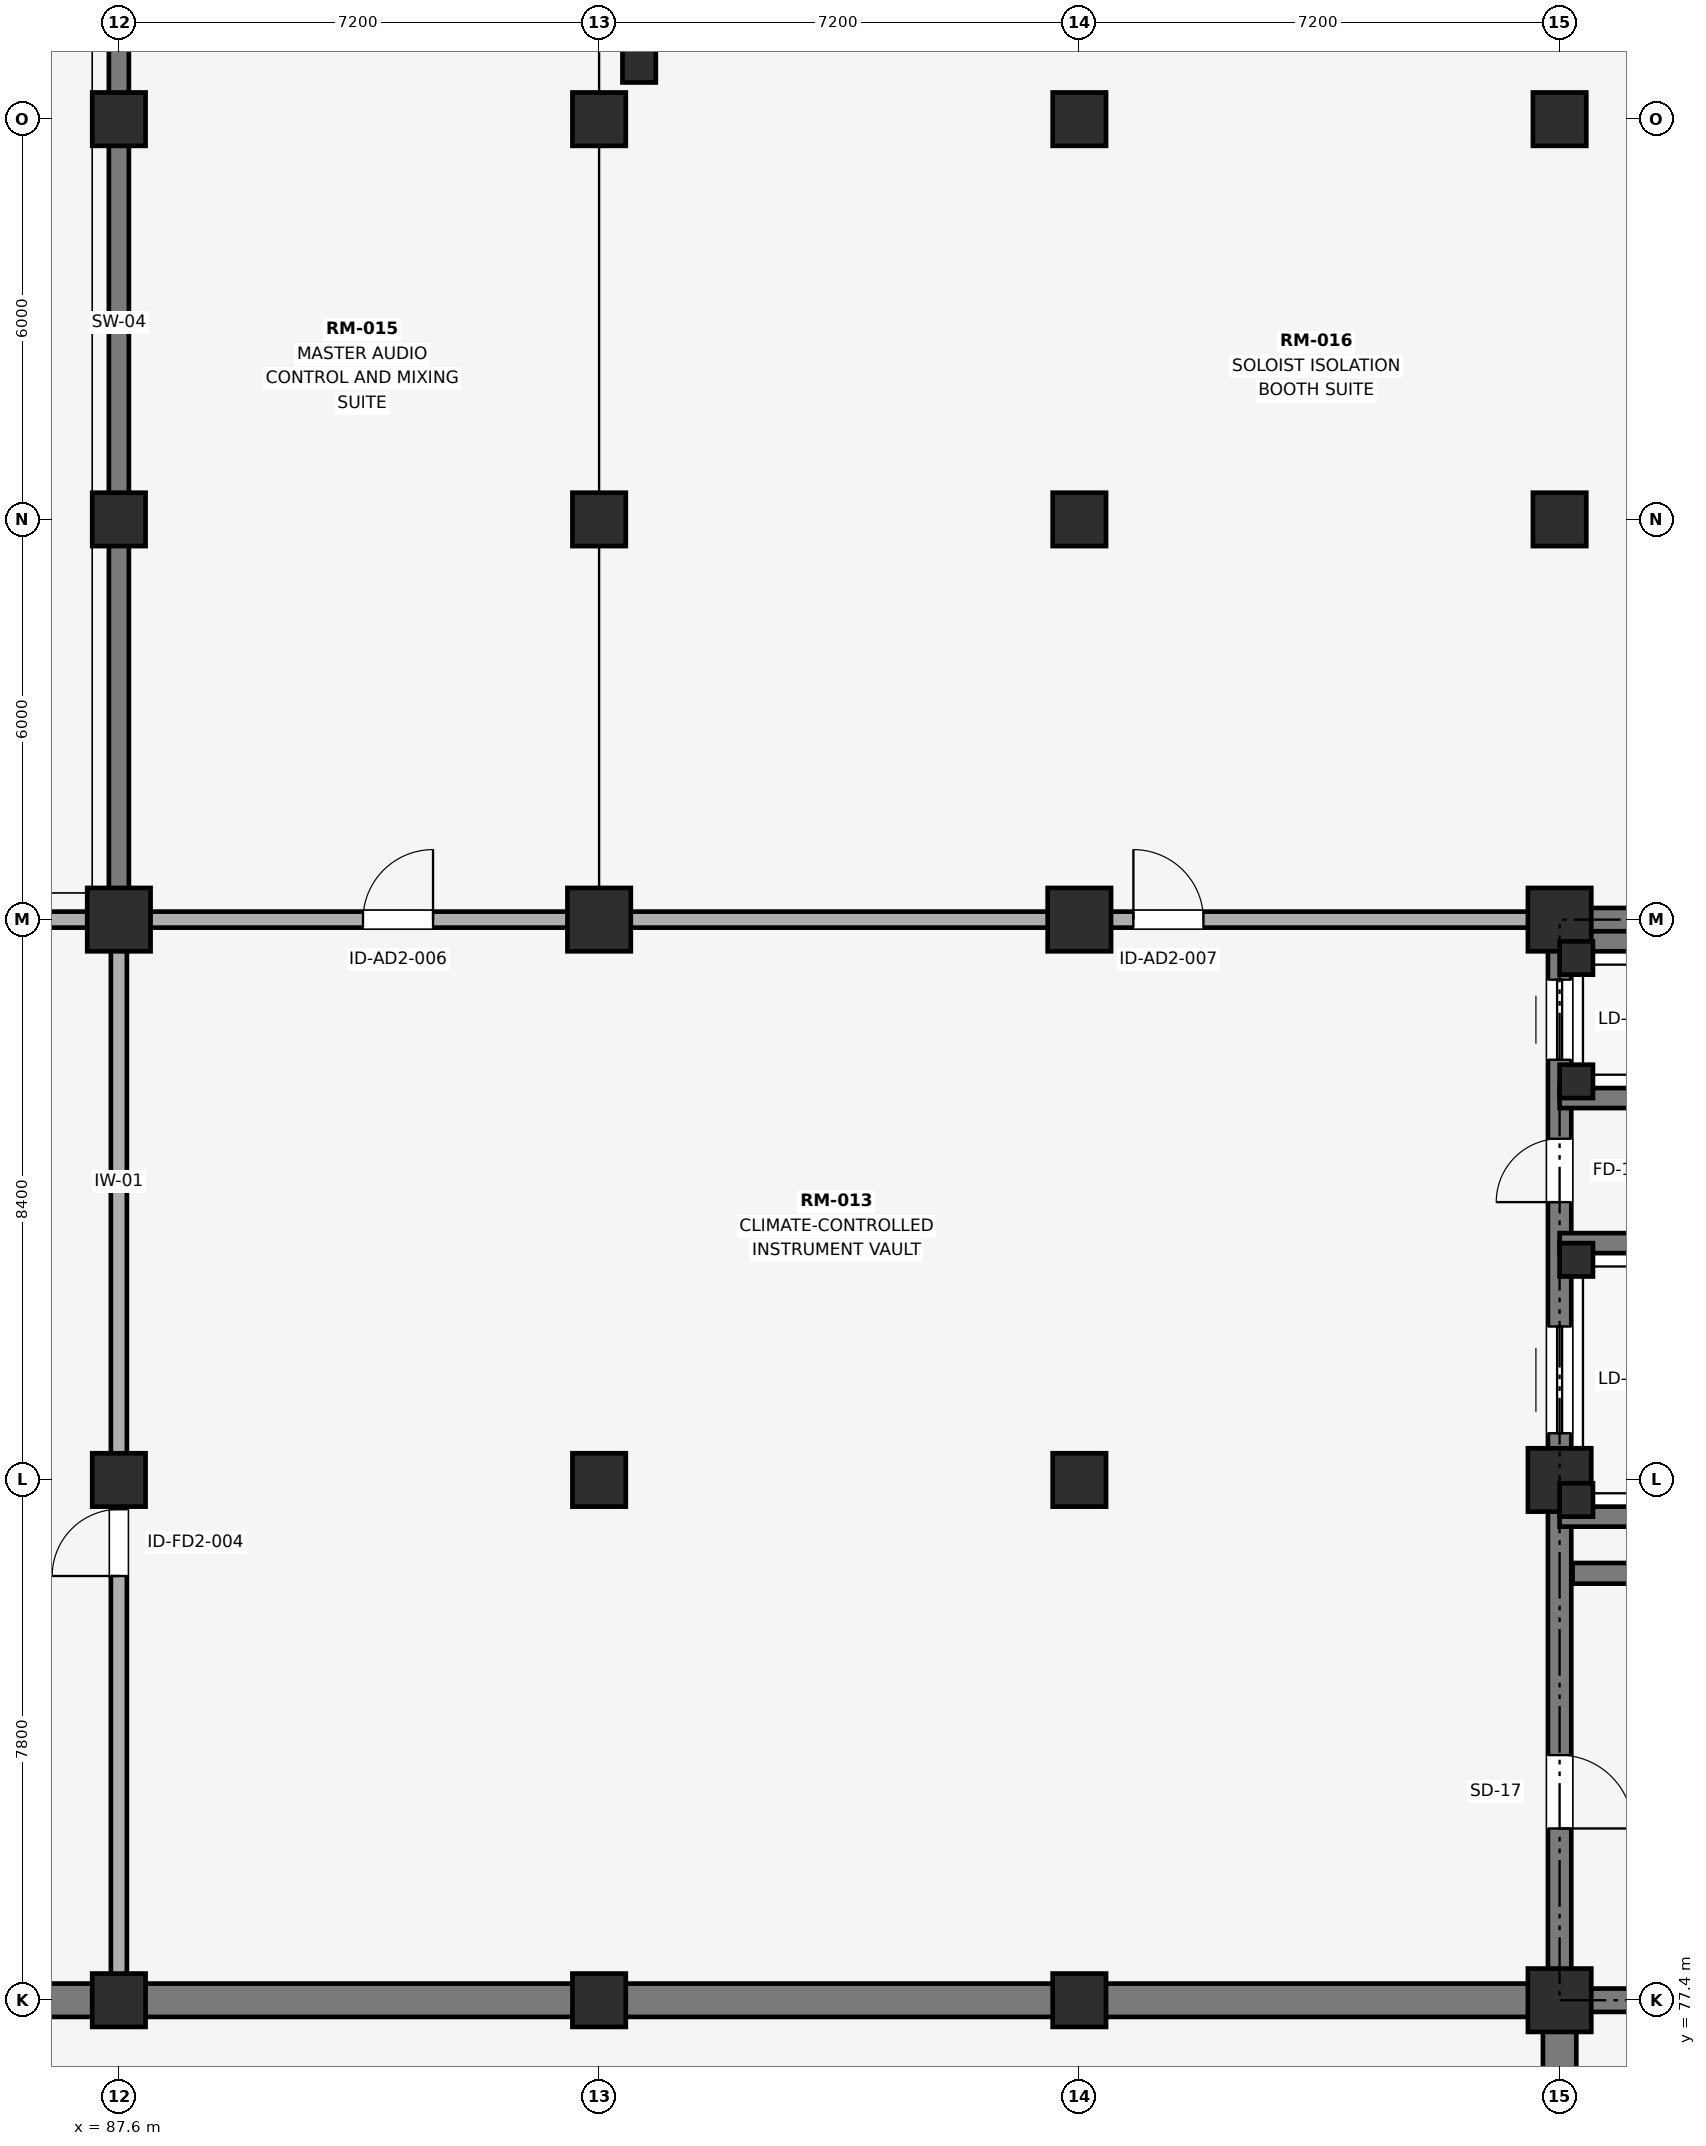
"""IFC4 building model, lengths in metres.
Left out: names, types, materials, properties, quantities, classifications, styles, units other than length and angle.
Written with IfcOpenShell. Run it as: python <this file> out.ifc"""

import sys

from ifc_helpers import new_model, si_unit, direction, frame, frame_2d, origin, origin_2d, place, context, subcontext, project, spatial, rectangle, extrude, element, fill, save


model = new_model("IFC4")
c1 = context("Model", 3, precision=1e-05, world=origin(), true_north=direction((0.0, 1.0)))
c2 = subcontext(c1, "Body", "Model", "MODEL_VIEW")
j1 = project(units=[si_unit("LENGTHUNIT", "METRE"), si_unit("PLANEANGLEUNIT", "RADIAN")], contexts=[c1])
p1 = place(None, origin())
s1 = spatial("IfcSite", under=j1, at=p1, CompositionType="ELEMENT")
p2 = place(p1, origin())
s2 = spatial("IfcBuilding", under=s1, at=p2, CompositionType="ELEMENT")
p3 = place(p2, frame((0.0, 0.0, -4.8)))
s3 = spatial("IfcBuildingStorey", under=s2, at=p3, CompositionType="ELEMENT", Elevation=-4.8)
for number, where, z_axis, x_axis in (
    (1, (87.6, 77.4, -0.45), (0.0, 0.0, 1.0), (1.0, 0.0, 0.0)),
    (2, (87.6, 85.2, -0.45), (0.0, 0.0, 1.0), (1.0, 0.0, 0.0)),
):
    element("IfcColumn", number, at=place(p3, frame(where, z_axis=z_axis, x_axis=x_axis)), inside=s3, PredefinedType="COLUMN", context=c2, shape_type="SweptSolid", body=[
        extrude(rectangle(XDim=0.8, YDim=0.8, at=origin_2d()), origin(), (0.0, 0.0, 1.0), 5.25),
    ])
p4 = place(p3, frame((87.6, 93.6, -0.45), z_axis=(0.0, 0.0, 1.0), x_axis=(1.0, 0.0, 0.0)))
e3 = element("IfcColumn", 3, at=p4, inside=s3, PredefinedType="COLUMN", context=c2, shape_type="SweptSolid", body=[
    extrude(rectangle(XDim=0.95, YDim=0.95, at=origin_2d()), origin(), (0.0, 0.0, 1.0), 5.25),
])
for number, where, z_axis, x_axis in (
    (4, (87.6, 99.6, -0.38), (0.0, 0.0, 1.0), (1.0, 0.0, 0.0)),
    (5, (87.6, 105.6, -0.38), (0.0, 0.0, 1.0), (1.0, 0.0, 0.0)),
):
    element("IfcColumn", number, at=place(p3, frame(where, z_axis=z_axis, x_axis=x_axis)), inside=s3, PredefinedType="COLUMN", context=c2, shape_type="SweptSolid", body=[
        extrude(rectangle(XDim=0.8, YDim=0.8, at=origin_2d()), origin(), (0.0, 0.0, 1.0), 5.18),
    ])
for number, where, z_axis, x_axis in (
    (6, (94.8, 77.4, -0.45), (0.0, 0.0, 1.0), (1.0, 0.0, 0.0)),
    (7, (94.8, 85.2, -0.45), (0.0, 0.0, 1.0), (1.0, 0.0, 0.0)),
):
    element("IfcColumn", number, at=place(p3, frame(where, z_axis=z_axis, x_axis=x_axis)), inside=s3, PredefinedType="COLUMN", context=c2, shape_type="SweptSolid", body=[
        extrude(rectangle(XDim=0.8, YDim=0.8, at=origin_2d()), origin(), (0.0, 0.0, 1.0), 5.25),
    ])
p5 = place(p3, frame((94.8, 93.6, -0.45), z_axis=(0.0, 0.0, 1.0), x_axis=(1.0, 0.0, 0.0)))
e8 = element("IfcColumn", 8, at=p5, inside=s3, PredefinedType="COLUMN", context=c2, shape_type="SweptSolid", body=[
    extrude(rectangle(XDim=0.95, YDim=0.95, at=origin_2d()), origin(), (0.0, 0.0, 1.0), 5.25),
])
for number, where, z_axis, x_axis in (
    (9, (94.8, 99.6, -0.45), (0.0, 0.0, 1.0), (1.0, 0.0, 0.0)),
    (10, (94.8, 105.6, -0.45), (0.0, 0.0, 1.0), (1.0, 0.0, 0.0)),
    (11, (102.0, 77.4, -0.45), (0.0, 0.0, 1.0), (1.0, 0.0, 0.0)),
    (12, (102.0, 85.2, -0.45), (0.0, 0.0, 1.0), (1.0, 0.0, 0.0)),
):
    element("IfcColumn", number, at=place(p3, frame(where, z_axis=z_axis, x_axis=x_axis)), inside=s3, PredefinedType="COLUMN", context=c2, shape_type="SweptSolid", body=[
        extrude(rectangle(XDim=0.8, YDim=0.8, at=origin_2d()), origin(), (0.0, 0.0, 1.0), 5.25),
    ])
p6 = place(p3, frame((102.0, 93.6, -0.45), z_axis=(0.0, 0.0, 1.0), x_axis=(1.0, 0.0, 0.0)))
e13 = element("IfcColumn", 13, at=p6, inside=s3, PredefinedType="COLUMN", context=c2, shape_type="SweptSolid", body=[
    extrude(rectangle(XDim=0.95, YDim=0.95, at=origin_2d()), origin(), (0.0, 0.0, 1.0), 5.25),
])
for number, where, z_axis, x_axis in (
    (14, (102.0, 99.6, -0.45), (0.0, 0.0, 1.0), (1.0, 0.0, 0.0)),
    (15, (102.0, 105.6, -0.45), (0.0, 0.0, 1.0), (1.0, 0.0, 0.0)),
):
    element("IfcColumn", number, at=place(p3, frame(where, z_axis=z_axis, x_axis=x_axis)), inside=s3, PredefinedType="COLUMN", context=c2, shape_type="SweptSolid", body=[
        extrude(rectangle(XDim=0.8, YDim=0.8, at=origin_2d()), origin(), (0.0, 0.0, 1.0), 5.25),
    ])
for number, where, z_axis, x_axis in (
    (16, (109.2, 77.4, -0.45), (0.0, 0.0, 1.0), (1.0, 0.0, 0.0)),
    (17, (109.2, 85.2, -0.45), (0.0, 0.0, 1.0), (1.0, 0.0, 0.0)),
    (18, (109.2, 93.6, -0.45), (0.0, 0.0, 1.0), (1.0, 0.0, 0.0)),
):
    element("IfcColumn", number, at=place(p3, frame(where, z_axis=z_axis, x_axis=x_axis)), inside=s3, PredefinedType="COLUMN", context=c2, shape_type="SweptSolid", body=[
        extrude(rectangle(XDim=0.95, YDim=0.95, at=origin_2d()), origin(), (0.0, 0.0, 1.0), 5.25),
    ])
for number, where, z_axis, x_axis in (
    (19, (109.2, 99.6, -0.45), (0.0, 0.0, 1.0), (1.0, 0.0, 0.0)),
    (20, (109.2, 105.6, -0.45), (0.0, 0.0, 1.0), (1.0, 0.0, 0.0)),
):
    element("IfcColumn", number, at=place(p3, frame(where, z_axis=z_axis, x_axis=x_axis)), inside=s3, PredefinedType="COLUMN", context=c2, shape_type="SweptSolid", body=[
        extrude(rectangle(XDim=0.8, YDim=0.8, at=origin_2d()), origin(), (0.0, 0.0, 1.0), 5.25),
    ])
p7 = place(p3, frame((58.59, 77.4, 0.0), z_axis=(0.0, 0.0, 1.0), x_axis=(1.0, 0.0, 0.0)))
e21 = element("IfcWall", 21, at=p7, inside=s3, PredefinedType="SOLIDWALL", context=c2, shape_type="SweptSolid", body=[
    extrude(rectangle(XDim=50.82, YDim=0.5, at=frame_2d((25.41, 0.0))), origin(), (0.0, 0.0, 1.0), 4.8),
])
p8 = place(p3, frame((109.2, 46.41, 0.0), z_axis=(0.0, 0.0, 1.0), x_axis=(0.0, 1.0, 0.0)))
e22 = element("IfcWall", 22, at=p8, inside=s3, PredefinedType="SOLIDWALL", context=c2, shape_type="SweptSolid", body=[
    extrude(rectangle(XDim=30.78, YDim=0.5, at=frame_2d((15.39, 0.0))), origin(), (0.0, 0.0, 1.0), 4.8),
])
p9 = place(p8, frame((4.19, 0.0, 0.0)))
e23 = element("IfcOpeningElement", 23, at=p9, cuts=e22, PredefinedType="OPENING", context=c2, shape_type="SweptSolid", body=[
    extrude(rectangle(XDim=0.95, YDim=2.1, at=frame_2d((0.475, 1.05))), frame((0.0, 0.26, 0.0), z_axis=(0.0, -1.0, 0.0), x_axis=(1.0, 0.0, 0.0)), (0.0, 0.0, 1.0), 0.52),
])
p10 = place(p3, frame((87.6, 93.75, 0.0), z_axis=(0.0, 0.0, 1.0), x_axis=(0.0, 1.0, 0.0)))
e24 = element("IfcWall", 24, at=p10, inside=s3, PredefinedType="SHEAR", context=c2, shape_type="SweptSolid", body=[
    extrude(rectangle(XDim=17.6, YDim=0.3, at=frame_2d((8.8, 0.0))), origin(), (0.0, 0.0, 1.0), 4.8),
])
p11 = place(p3, frame((109.52, 77.4, 0.0), z_axis=(0.0, 0.0, 1.0), x_axis=(1.0, 0.0, 0.0)))
e25 = element("IfcWall", 25, at=p11, inside=s3, PredefinedType="SHEAR", context=c2, shape_type="SweptSolid", body=[
    extrude(rectangle(XDim=9.455, YDim=0.35, at=frame_2d((4.728, 0.0))), origin(), (0.0, 0.0, 1.0), 4.8),
])
p12 = place(p3, frame((109.025, 93.6, 0.0), z_axis=(0.0, 0.0, 1.0), x_axis=(1.0, 0.0, 0.0)))
e26 = element("IfcWall", 26, at=p12, inside=s3, PredefinedType="SHEAR", context=c2, shape_type="SweptSolid", body=[
    extrude(rectangle(XDim=9.95, YDim=0.35, at=frame_2d((4.975, 0.0))), origin(), (0.0, 0.0, 1.0), 4.8),
])
p13 = place(p3, frame((109.2, 77.575, 0.0), z_axis=(0.0, 0.0, 1.0), x_axis=(0.0, 1.0, 0.0)))
e27 = element("IfcWall", 27, at=p13, inside=s3, PredefinedType="SHEAR", context=c2, shape_type="SweptSolid", body=[
    extrude(rectangle(XDim=15.85, YDim=0.35, at=frame_2d((7.925, 0.0))), origin(), (0.0, 0.0, 1.0), 4.8),
])
p14 = place(p13, frame((8.325, 0.0, 0.0)))
e28 = element("IfcOpeningElement", 28, at=p14, cuts=e27, PredefinedType="OPENING", context=c2, shape_type="SweptSolid", body=[
    extrude(rectangle(XDim=1.6, YDim=2.4, at=frame_2d((0.8, 1.2))), frame((0.0, 0.185, 0.0), z_axis=(0.0, -1.0, 0.0), x_axis=(1.0, 0.0, 0.0)), (0.0, 0.0, 1.0), 0.37),
])
p15 = place(p13, frame((13.925, 0.0, 0.0)))
e29 = element("IfcOpeningElement", 29, at=p15, cuts=e27, PredefinedType="OPENING", context=c2, shape_type="SweptSolid", body=[
    extrude(rectangle(XDim=1.2, YDim=2.2, at=frame_2d((0.6, 1.1))), frame((0.0, 0.185, 0.0), z_axis=(0.0, -1.0, 0.0), x_axis=(1.0, 0.0, 0.0)), (0.0, 0.0, 1.0), 0.37),
])
p16 = place(p13, frame((11.79, 0.0, 0.0)))
e30 = element("IfcOpeningElement", 30, at=p16, cuts=e27, PredefinedType="OPENING", context=c2, shape_type="SweptSolid", body=[
    extrude(rectangle(XDim=0.95, YDim=2.1, at=frame_2d((0.475, 1.05))), frame((0.0, 0.185, 0.0), z_axis=(0.0, -1.0, 0.0), x_axis=(1.0, 0.0, 0.0)), (0.0, 0.0, 1.0), 0.37),
])
p17 = place(p13, frame((2.4, 0.0, 0.0)))
e31 = element("IfcOpeningElement", 31, at=p17, cuts=e27, PredefinedType="OPENING", context=c2, shape_type="SweptSolid", body=[
    extrude(rectangle(XDim=1.1, YDim=2.2, at=frame_2d((0.55, 1.1))), frame((0.0, 0.185, 0.0), z_axis=(0.0, -1.0, 0.0), x_axis=(1.0, 0.0, 0.0)), (0.0, 0.0, 1.0), 0.37),
])
p18 = place(p3, frame((109.395, 83.8, 0.0), z_axis=(0.0, 0.0, 1.0), x_axis=(1.0, 0.0, 0.0)))
e32 = element("IfcWall", 32, at=p18, inside=s3, PredefinedType="SHEAR", context=c2, shape_type="SweptSolid", body=[
    extrude(rectangle(XDim=9.21, YDim=0.31, at=frame_2d((4.605, 0.0))), origin(), (0.0, 0.0, 1.0), 4.8),
])
p19 = place(p3, frame((95.4, 106.4, -0.45), z_axis=(0.0, 0.0, 1.0), x_axis=(1.0, 0.0, 0.0)))
e33 = element("IfcColumn", 33, at=p19, inside=s3, PredefinedType="COLUMN", context=c2, shape_type="SweptSolid", body=[
    extrude(rectangle(XDim=0.5, YDim=0.5, at=origin_2d()), origin(), (0.0, 0.0, 1.0), 5.03),
])
for number, where, z_axis, x_axis in (
    (34, (109.45, 84.9, -2.48), (0.0, 0.0, 1.0), (1.0, 0.0, 0.0)),
    (35, (109.45, 88.5, -2.48), (0.0, 0.0, 1.0), (1.0, 0.0, 0.0)),
):
    element("IfcColumn", number, at=place(p3, frame(where, z_axis=z_axis, x_axis=x_axis)), inside=s3, PredefinedType="COLUMN", context=c2, shape_type="SweptSolid", body=[
        extrude(rectangle(XDim=0.5, YDim=0.5, at=origin_2d()), origin(), (0.0, 0.0, 1.0), 0.5),
    ])
for number, where, z_axis, x_axis in (
    (36, (109.2, 84.65, -1.6), (0.0, 0.0, 1.0), (1.0, 0.0, 0.0)),
    (37, (109.2, 88.75, -1.6), (0.0, 0.0, 1.0), (1.0, 0.0, 0.0)),
):
    element("IfcWall", number, at=place(p3, frame(where, z_axis=z_axis, x_axis=x_axis)), inside=s3, PredefinedType="SHEAR", context=c2, shape_type="SweptSolid", body=[
        extrude(rectangle(XDim=3.5, YDim=0.3, at=frame_2d((1.75, 0.0))), origin(), (0.0, 0.0, 1.0), 6.4),
    ])
for number, where, z_axis, x_axis in (
    (38, (109.45, 91.175, -2.48), (0.0, 0.0, 1.0), (1.0, 0.0, 0.0)),
    (39, (109.45, 93.025, -2.48), (0.0, 0.0, 1.0), (1.0, 0.0, 0.0)),
):
    element("IfcColumn", number, at=place(p3, frame(where, z_axis=z_axis, x_axis=x_axis)), inside=s3, PredefinedType="COLUMN", context=c2, shape_type="SweptSolid", body=[
        extrude(rectangle(XDim=0.5, YDim=0.5, at=origin_2d()), origin(), (0.0, 0.0, 1.0), 0.5),
    ])
for number, where, z_axis, x_axis in (
    (40, (109.2, 90.925, -1.6), (0.0, 0.0, 1.0), (1.0, 0.0, 0.0)),
    (41, (109.2, 93.275, -1.6), (0.0, 0.0, 1.0), (1.0, 0.0, 0.0)),
):
    element("IfcWall", number, at=place(p3, frame(where, z_axis=z_axis, x_axis=x_axis)), inside=s3, PredefinedType="SHEAR", context=c2, shape_type="SweptSolid", body=[
        extrude(rectangle(XDim=2.8, YDim=0.3, at=frame_2d((1.4, 0.0))), origin(), (0.0, 0.0, 1.0), 6.4),
    ])
p20 = place(p3, frame((87.6, 77.76, 0.0), z_axis=(0.0, 0.0, 1.0), x_axis=(0.0, 1.0, 0.0)))
e42 = element("IfcWall", 42, at=p20, inside=s3, PredefinedType="PARTITIONING", context=c2, shape_type="SweptSolid", body=[
    extrude(rectangle(XDim=15.48, YDim=0.24, at=frame_2d((7.74, 0.0))), origin(), (0.0, 0.0, 1.0), 3.68),
])
p21 = place(p20, frame((6.0, 0.0, 0.0)))
e43 = element("IfcOpeningElement", 43, at=p21, cuts=e42, PredefinedType="OPENING", context=c2, shape_type="SweptSolid", body=[
    extrude(rectangle(XDim=1.0, YDim=2.2, at=frame_2d((0.5, 1.1))), frame((0.0, 0.13, 0.0), z_axis=(0.0, -1.0, 0.0), x_axis=(1.0, 0.0, 0.0)), (0.0, 0.0, 1.0), 0.26),
])
p22 = place(p3, frame((59.16, 93.6, 0.0), z_axis=(0.0, 0.0, 1.0), x_axis=(1.0, 0.0, 0.0)))
e44 = element("IfcWall", 44, at=p22, inside=s3, PredefinedType="PARTITIONING", context=c2, shape_type="SweptSolid", body=[
    extrude(rectangle(XDim=49.68, YDim=0.24, at=frame_2d((24.84, 0.0))), origin(), (0.0, 0.0, 1.0), 3.73),
])
p23 = place(p22, frame((11.1, 0.0, 0.0)))
e45 = element("IfcOpeningElement", 45, at=p23, cuts=e44, PredefinedType="OPENING", context=c2, shape_type="SweptSolid", body=[
    extrude(rectangle(XDim=2.0, YDim=2.45, at=frame_2d((1.0, 1.225))), frame((0.0, 0.13, 0.0), z_axis=(0.0, -1.0, 0.0), x_axis=(1.0, 0.0, 0.0)), (0.0, 0.0, 1.0), 0.26),
])
p24 = place(p22, frame((32.1, 0.0, 0.0)))
e46 = element("IfcOpeningElement", 46, at=p24, cuts=e44, PredefinedType="OPENING", context=c2, shape_type="SweptSolid", body=[
    extrude(rectangle(XDim=1.05, YDim=2.25, at=frame_2d((0.525, 1.125))), frame((0.0, 0.13, 0.0), z_axis=(0.0, -1.0, 0.0), x_axis=(1.0, 0.0, 0.0)), (0.0, 0.0, 1.0), 0.26),
])
p25 = place(p22, frame((43.65, 0.0, 0.0)))
e47 = element("IfcOpeningElement", 47, at=p25, cuts=e44, PredefinedType="OPENING", context=c2, shape_type="SweptSolid", body=[
    extrude(rectangle(XDim=1.05, YDim=2.25, at=frame_2d((0.525, 1.125))), frame((0.0, 0.13, 0.0), z_axis=(0.0, -1.0, 0.0), x_axis=(1.0, 0.0, 0.0)), (0.0, 0.0, 1.0), 0.26),
])
p26 = place(p14, origin())
e48 = element("IfcDoor", 48, at=p26, inside=s3, OperationType="SLIDING_TO_LEFT", PredefinedType="DOOR", context=c2, shape_type="SweptSolid", body=[
    extrude(rectangle(XDim=1.6, YDim=2.4, at=frame_2d((0.8, 1.2))), frame((0.0, 0.025, 0.0), z_axis=(0.0, -1.0, 0.0), x_axis=(1.0, 0.0, 0.0)), (0.0, 0.0, 1.0), 0.05),
])
fill(e28, e48)
p27 = place(p15, origin())
e49 = element("IfcDoor", 49, at=p27, inside=s3, OperationType="SLIDING_TO_RIGHT", PredefinedType="DOOR", context=c2, shape_type="SweptSolid", body=[
    extrude(rectangle(XDim=1.2, YDim=2.2, at=frame_2d((0.6, 1.1))), frame((0.0, 0.025, 0.0), z_axis=(0.0, -1.0, 0.0), x_axis=(1.0, 0.0, 0.0)), (0.0, 0.0, 1.0), 0.05),
])
fill(e29, e49)
p28 = place(p16, origin())
e50 = element("IfcDoor", 50, at=p28, inside=s3, OperationType="SINGLE_SWING_LEFT", PredefinedType="DOOR", context=c2, shape_type="SweptSolid", body=[
    extrude(rectangle(XDim=0.95, YDim=2.1, at=frame_2d((0.475, 1.05))), frame((0.0, 0.025, 0.0), z_axis=(0.0, -1.0, 0.0), x_axis=(1.0, 0.0, 0.0)), (0.0, 0.0, 1.0), 0.05),
])
fill(e30, e50)
p29 = place(p17, frame((1.1, 0.0, 0.0), z_axis=(0.0, 0.0, 1.0), x_axis=(-1.0, 0.0, 0.0)))
e51 = element("IfcDoor", 51, at=p29, inside=s3, OperationType="SINGLE_SWING_LEFT", PredefinedType="DOOR", context=c2, shape_type="SweptSolid", body=[
    extrude(rectangle(XDim=1.1, YDim=2.2, at=frame_2d((0.55, 1.1))), frame((0.0, 0.025, 0.0), z_axis=(0.0, -1.0, 0.0), x_axis=(1.0, 0.0, 0.0)), (0.0, 0.0, 1.0), 0.05),
])
fill(e31, e51)
p30 = place(p21, origin())
e52 = element("IfcDoor", 52, at=p30, inside=s3, OperationType="SINGLE_SWING_LEFT", PredefinedType="DOOR", context=c2, shape_type="SweptSolid", body=[
    extrude(rectangle(XDim=1.0, YDim=2.2, at=frame_2d((0.5, 1.1))), frame((0.0, 0.025, 0.0), z_axis=(0.0, -1.0, 0.0), x_axis=(1.0, 0.0, 0.0)), (0.0, 0.0, 1.0), 0.05),
])
fill(e43, e52)
p31 = place(p24, origin())
e53 = element("IfcDoor", 53, at=p31, inside=s3, OperationType="SINGLE_SWING_RIGHT", PredefinedType="DOOR", context=c2, shape_type="SweptSolid", body=[
    extrude(rectangle(XDim=1.05, YDim=2.25, at=frame_2d((0.525, 1.125))), frame((0.0, 0.025, 0.0), z_axis=(0.0, -1.0, 0.0), x_axis=(1.0, 0.0, 0.0)), (0.0, 0.0, 1.0), 0.05),
])
fill(e46, e53)
p32 = place(p25, origin())
e54 = element("IfcDoor", 54, at=p32, inside=s3, OperationType="SINGLE_SWING_LEFT", PredefinedType="DOOR", context=c2, shape_type="SweptSolid", body=[
    extrude(rectangle(XDim=1.05, YDim=2.25, at=frame_2d((0.525, 1.125))), frame((0.0, 0.025, 0.0), z_axis=(0.0, -1.0, 0.0), x_axis=(1.0, 0.0, 0.0)), (0.0, 0.0, 1.0), 0.05),
])
fill(e47, e54)
save(model, sys.argv[1])
